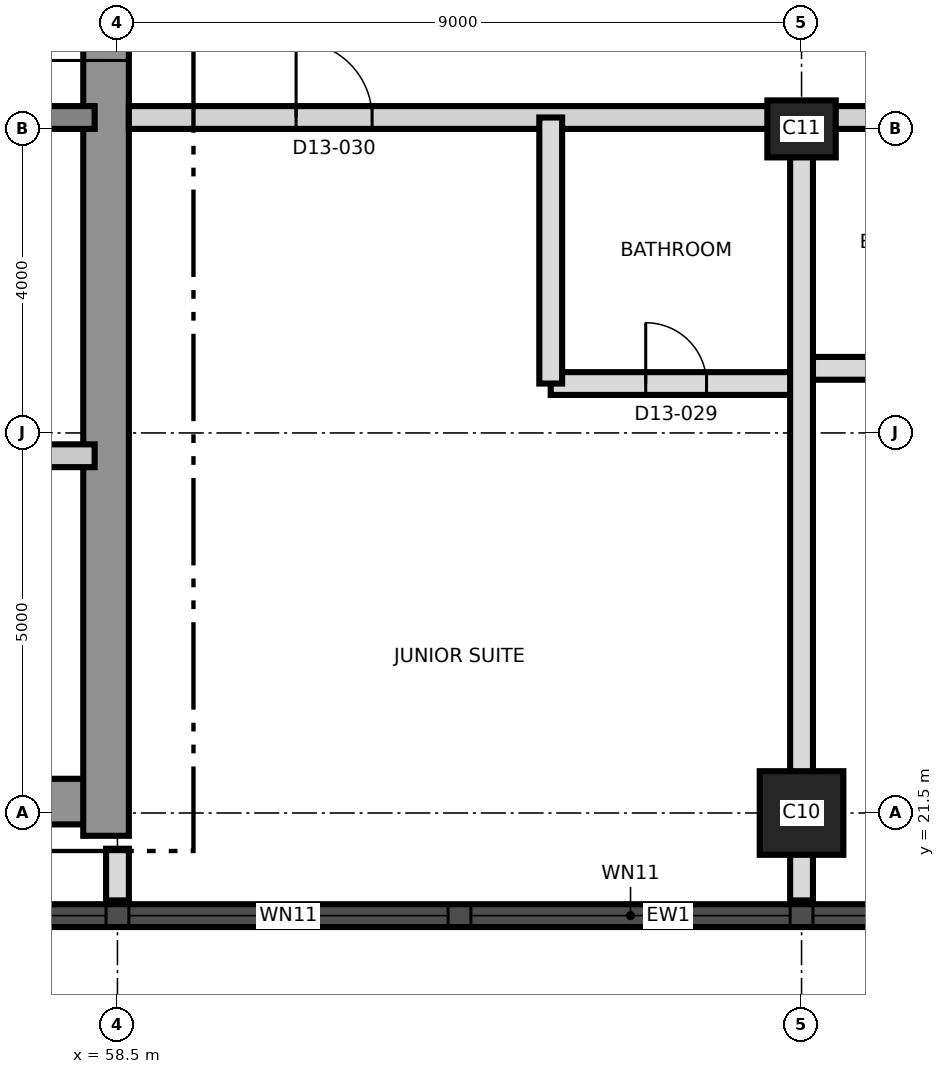
"""IFC4 building model, lengths in metres.
Left out: names, types, materials, properties, quantities, classifications, styles, units other than length and angle.
Written with IfcOpenShell. Run it as: python <this file> out.ifc"""

import sys

from ifc_helpers import new_model, si_unit, direction, frame, frame_2d, origin, origin_2d, place, context, subcontext, project, spatial, rectangle, extrude, element, fill, save


model = new_model("IFC4")
c1 = context("Model", 3, precision=1e-05, world=origin(), true_north=direction((0.0, 1.0)))
c2 = subcontext(c1, "Body", "Model", "MODEL_VIEW")
j1 = project(units=[si_unit("LENGTHUNIT", "METRE"), si_unit("PLANEANGLEUNIT", "RADIAN")], contexts=[c1])
p1 = place(None, origin())
s1 = spatial("IfcSite", under=j1, at=p1, CompositionType="ELEMENT")
p2 = place(p1, origin())
s2 = spatial("IfcBuilding", under=s1, at=p2, CompositionType="ELEMENT")
p3 = place(p2, frame((0.0, 0.0, 142.2)))
s3 = spatial("IfcBuildingStorey", under=s2, at=p3, CompositionType="ELEMENT", Elevation=142.2)
p4 = place(p3, frame((31.2, 21.65, 0.0), z_axis=(0.0, 0.0, 1.0), x_axis=(1.0, 0.0, 0.0)))
e1 = element("IfcWall", 1, at=p4, inside=s3, PredefinedType="SHEAR", context=c2, shape_type="SweptSolid", body=[
    extrude(rectangle(XDim=27.0, YDim=0.6, at=frame_2d((13.5, 0.0))), origin(), (0.0, 0.0, 1.0), 3.7),
])
p5 = place(p3, frame((58.35, 21.2, 0.0), z_axis=(0.0, 0.0, 1.0), x_axis=(0.0, 1.0, 0.0)))
e2 = element("IfcWall", 2, at=p5, inside=s3, PredefinedType="SHEAR", context=c2, shape_type="SweptSolid", body=[
    extrude(rectangle(XDim=18.6, YDim=0.6, at=frame_2d((9.3, 0.0))), origin(), (0.0, 0.0, 1.0), 3.7),
])
p6 = place(p5, frame((10.2, 0.0, 0.0)))
e3 = element("IfcOpeningElement", 3, at=p6, cuts=e2, PredefinedType="OPENING", context=c2, shape_type="SweptSolid", body=[
    extrude(rectangle(XDim=1.2, YDim=2.1, at=frame_2d((0.6, 1.05))), frame((0.0, 0.31, 0.0), z_axis=(0.0, -1.0, 0.0), x_axis=(1.0, 0.0, 0.0)), (0.0, 0.0, 1.0), 0.62),
])
p7 = place(p3, frame((31.8, 30.65, 0.0), z_axis=(0.0, 0.0, 1.0), x_axis=(1.0, 0.0, 0.0)))
e4 = element("IfcWall", 4, at=p7, inside=s3, PredefinedType="SHEAR", context=c2, shape_type="SweptSolid", body=[
    extrude(rectangle(XDim=26.4, YDim=0.3, at=frame_2d((13.2, 0.0))), origin(), (0.0, 0.0, 1.0), 3.7),
])
p8 = place(p7, frame((24.7, 0.0, 0.0)))
e5 = element("IfcOpeningElement", 5, at=p8, cuts=e4, PredefinedType="OPENING", context=c2, shape_type="SweptSolid", body=[
    extrude(rectangle(XDim=1.0, YDim=2.1, at=frame_2d((0.5, 1.05))), frame((0.0, 0.16, 0.0), z_axis=(0.0, -1.0, 0.0), x_axis=(1.0, 0.0, 0.0)), (0.0, 0.0, 1.0), 0.32),
])
p9 = place(p7, frame((4.0, 0.0, 0.0)))
e6 = element("IfcOpeningElement", 6, at=p9, cuts=e4, PredefinedType="OPENING", context=c2, shape_type="SweptSolid", body=[
    extrude(rectangle(XDim=1.0, YDim=2.1, at=frame_2d((0.5, 1.05))), frame((0.0, 0.16, 0.0), z_axis=(0.0, -1.0, 0.0), x_axis=(1.0, 0.0, 0.0)), (0.0, 0.0, 1.0), 0.32),
])
p10 = place(p3, frame((67.5, 21.5, 0.0), z_axis=(0.0, 0.0, 1.0), x_axis=(1.0, 0.0, 0.0)))
e7 = element("IfcColumn", 7, at=p10, inside=s3, PredefinedType="COLUMN", context=c2, shape_type="SweptSolid", body=[
    extrude(rectangle(XDim=1.1, YDim=1.1, at=origin_2d()), origin(), (0.0, 0.0, 1.0), 3.7),
])
p11 = place(p3, frame((67.5, 30.5, 0.0), z_axis=(0.0, 0.0, 1.0), x_axis=(1.0, 0.0, 0.0)))
e8 = element("IfcColumn", 8, at=p11, inside=s3, PredefinedType="COLUMN", context=c2, shape_type="SweptSolid", body=[
    extrude(rectangle(XDim=0.9, YDim=0.75, at=origin_2d()), origin(), (0.0, 0.0, 1.0), 3.7),
])
p12 = place(p3, frame((44.011, 20.15, 0.0), z_axis=(0.0, 0.0, 1.0), x_axis=(1.0, 0.0, 0.0)))
e9 = element("IfcWall", 9, at=p12, inside=s3, PredefinedType="SOLIDWALL", context=c2, shape_type="SweptSolid", body=[
    extrude(rectangle(XDim=43.476, YDim=0.3, at=frame_2d((21.738, 0.0))), origin(), (0.0, 0.0, 1.0), 3.4),
])
p13 = place(p12, frame((1.845, 0.0, 0.3)))
e10 = element("IfcOpeningElement", 10, at=p13, cuts=e9, PredefinedType="OPENING", context=c2, shape_type="SweptSolid", body=[
    extrude(rectangle(XDim=1.8, YDim=2.4, at=frame_2d((0.9, 1.2))), frame((0.0, 0.16, 0.0), z_axis=(0.0, -1.0, 0.0), x_axis=(1.0, 0.0, 0.0)), (0.0, 0.0, 1.0), 0.32),
])
p14 = place(p12, frame((5.639, 0.0, 0.9)))
e11 = element("IfcOpeningElement", 11, at=p14, cuts=e9, PredefinedType="OPENING", context=c2, shape_type="SweptSolid", body=[
    extrude(rectangle(XDim=4.2, YDim=1.5, at=frame_2d((2.1, 0.75))), frame((0.0, 0.16, 0.0), z_axis=(0.0, -1.0, 0.0), x_axis=(1.0, 0.0, 0.0)), (0.0, 0.0, 1.0), 0.32),
])
p15 = place(p12, frame((10.139, 0.0, 0.9)))
e12 = element("IfcOpeningElement", 12, at=p15, cuts=e9, PredefinedType="OPENING", context=c2, shape_type="SweptSolid", body=[
    extrude(rectangle(XDim=4.2, YDim=1.5, at=frame_2d((2.1, 0.75))), frame((0.0, 0.16, 0.0), z_axis=(0.0, -1.0, 0.0), x_axis=(1.0, 0.0, 0.0)), (0.0, 0.0, 1.0), 0.32),
])
p16 = place(p12, frame((14.639, 0.0, 0.9)))
e13 = element("IfcOpeningElement", 13, at=p16, cuts=e9, PredefinedType="OPENING", context=c2, shape_type="SweptSolid", body=[
    extrude(rectangle(XDim=4.2, YDim=1.5, at=frame_2d((2.1, 0.75))), frame((0.0, 0.16, 0.0), z_axis=(0.0, -1.0, 0.0), x_axis=(1.0, 0.0, 0.0)), (0.0, 0.0, 1.0), 0.32),
])
p17 = place(p12, frame((19.139, 0.0, 0.9)))
e14 = element("IfcOpeningElement", 14, at=p17, cuts=e9, PredefinedType="OPENING", context=c2, shape_type="SweptSolid", body=[
    extrude(rectangle(XDim=4.2, YDim=1.5, at=frame_2d((2.1, 0.75))), frame((0.0, 0.16, 0.0), z_axis=(0.0, -1.0, 0.0), x_axis=(1.0, 0.0, 0.0)), (0.0, 0.0, 1.0), 0.32),
])
p18 = place(p12, frame((23.639, 0.0, 0.9)))
e15 = element("IfcOpeningElement", 15, at=p18, cuts=e9, PredefinedType="OPENING", context=c2, shape_type="SweptSolid", body=[
    extrude(rectangle(XDim=4.2, YDim=1.5, at=frame_2d((2.1, 0.75))), frame((0.0, 0.16, 0.0), z_axis=(0.0, -1.0, 0.0), x_axis=(1.0, 0.0, 0.0)), (0.0, 0.0, 1.0), 0.32),
])
p19 = place(p12, frame((28.139, 0.0, 0.9)))
e16 = element("IfcOpeningElement", 16, at=p19, cuts=e9, PredefinedType="OPENING", context=c2, shape_type="SweptSolid", body=[
    extrude(rectangle(XDim=4.2, YDim=1.5, at=frame_2d((2.1, 0.75))), frame((0.0, 0.16, 0.0), z_axis=(0.0, -1.0, 0.0), x_axis=(1.0, 0.0, 0.0)), (0.0, 0.0, 1.0), 0.32),
])
p20 = place(p12, frame((32.639, 0.0, 0.9)))
e17 = element("IfcOpeningElement", 17, at=p20, cuts=e9, PredefinedType="OPENING", context=c2, shape_type="SweptSolid", body=[
    extrude(rectangle(XDim=4.2, YDim=1.5, at=frame_2d((2.1, 0.75))), frame((0.0, 0.16, 0.0), z_axis=(0.0, -1.0, 0.0), x_axis=(1.0, 0.0, 0.0)), (0.0, 0.0, 1.0), 0.32),
])
p21 = place(p12, frame((37.139, 0.0, 0.9)))
e18 = element("IfcOpeningElement", 18, at=p21, cuts=e9, PredefinedType="OPENING", context=c2, shape_type="SweptSolid", body=[
    extrude(rectangle(XDim=4.2, YDim=1.5, at=frame_2d((2.1, 0.75))), frame((0.0, 0.16, 0.0), z_axis=(0.0, -1.0, 0.0), x_axis=(1.0, 0.0, 0.0)), (0.0, 0.0, 1.0), 0.32),
])
p22 = place(p3, frame((55.8, 26.2, 0.0), z_axis=(0.0, 0.0, 1.0), x_axis=(1.0, 0.0, 0.0)))
e19 = element("IfcWall", 19, at=p22, inside=s3, PredefinedType="PARTITIONING", context=c2, shape_type="SweptSolid", body=[
    extrude(rectangle(XDim=2.4, YDim=0.3, at=frame_2d((1.2, 0.0))), origin(), (0.0, 0.0, 1.0), 3.4),
])
p23 = place(p22, frame((0.75, 0.0, 0.0)))
e20 = element("IfcOpeningElement", 20, at=p23, cuts=e19, PredefinedType="OPENING", context=c2, shape_type="SweptSolid", body=[
    extrude(rectangle(XDim=0.9, YDim=2.1, at=frame_2d((0.45, 1.05))), frame((0.0, 0.16, 0.0), z_axis=(0.0, -1.0, 0.0), x_axis=(1.0, 0.0, 0.0)), (0.0, 0.0, 1.0), 0.32),
])
p24 = place(p3, frame((64.2, 27.15, 0.0), z_axis=(0.0, 0.0, 1.0), x_axis=(1.0, 0.0, 0.0)))
e21 = element("IfcWall", 21, at=p24, inside=s3, PredefinedType="PARTITIONING", context=c2, shape_type="SweptSolid", body=[
    extrude(rectangle(XDim=3.3, YDim=0.3, at=frame_2d((1.65, 0.0))), origin(), (0.0, 0.0, 1.0), 3.4),
])
p25 = place(p24, frame((1.25, 0.0, 0.0)))
e22 = element("IfcOpeningElement", 22, at=p25, cuts=e21, PredefinedType="OPENING", context=c2, shape_type="SweptSolid", body=[
    extrude(rectangle(XDim=0.8, YDim=2.1, at=frame_2d((0.4, 1.05))), frame((0.0, 0.16, 0.0), z_axis=(0.0, -1.0, 0.0), x_axis=(1.0, 0.0, 0.0)), (0.0, 0.0, 1.0), 0.32),
])
p26 = place(p3, frame((67.5, 27.35, 0.0), z_axis=(0.0, 0.0, 1.0), x_axis=(1.0, 0.0, 0.0)))
e23 = element("IfcWall", 23, at=p26, inside=s3, PredefinedType="PARTITIONING", context=c2, shape_type="SweptSolid", body=[
    extrude(rectangle(XDim=3.0, YDim=0.3, at=frame_2d((1.5, 0.0))), origin(), (0.0, 0.0, 1.0), 3.4),
])
p27 = place(p26, frame((1.1, 0.0, 0.0)))
e24 = element("IfcOpeningElement", 24, at=p27, cuts=e23, PredefinedType="OPENING", context=c2, shape_type="SweptSolid", body=[
    extrude(rectangle(XDim=0.8, YDim=2.1, at=frame_2d((0.4, 1.05))), frame((0.0, 0.16, 0.0), z_axis=(0.0, -1.0, 0.0), x_axis=(1.0, 0.0, 0.0)), (0.0, 0.0, 1.0), 0.32),
])
p28 = place(p3, frame((58.65, 30.65, 0.0), z_axis=(0.0, 0.0, 1.0), x_axis=(1.0, 0.0, 0.0)))
e25 = element("IfcWall", 25, at=p28, inside=s3, PredefinedType="PARTITIONING", context=c2, shape_type="SweptSolid", body=[
    extrude(rectangle(XDim=26.68, YDim=0.3, at=frame_2d((13.34, 0.0))), origin(), (0.0, 0.0, 1.0), 3.4),
])
p29 = place(p28, frame((2.2, 0.0, 0.0)))
e26 = element("IfcOpeningElement", 26, at=p29, cuts=e25, PredefinedType="OPENING", context=c2, shape_type="SweptSolid", body=[
    extrude(rectangle(XDim=1.0, YDim=2.4, at=frame_2d((0.5, 1.2))), frame((0.0, 0.16, 0.0), z_axis=(0.0, -1.0, 0.0), x_axis=(1.0, 0.0, 0.0)), (0.0, 0.0, 1.0), 0.32),
])
p30 = place(p28, frame((12.85, 0.0, 0.0)))
e27 = element("IfcOpeningElement", 27, at=p30, cuts=e25, PredefinedType="OPENING", context=c2, shape_type="SweptSolid", body=[
    extrude(rectangle(XDim=1.0, YDim=2.4, at=frame_2d((0.5, 1.2))), frame((0.0, 0.16, 0.0), z_axis=(0.0, -1.0, 0.0), x_axis=(1.0, 0.0, 0.0)), (0.0, 0.0, 1.0), 0.32),
])
p31 = place(p28, frame((20.77, 0.0, 0.0)))
e28 = element("IfcOpeningElement", 28, at=p31, cuts=e25, PredefinedType="OPENING", context=c2, shape_type="SweptSolid", body=[
    extrude(rectangle(XDim=1.0, YDim=2.1, at=frame_2d((0.5, 1.05))), frame((0.0, 0.16, 0.0), z_axis=(0.0, -1.0, 0.0), x_axis=(1.0, 0.0, 0.0)), (0.0, 0.0, 1.0), 0.32),
])
p32 = place(p28, frame((22.57, 0.0, 0.0)))
e29 = element("IfcOpeningElement", 29, at=p32, cuts=e25, PredefinedType="OPENING", context=c2, shape_type="SweptSolid", body=[
    extrude(rectangle(XDim=1.0, YDim=2.1, at=frame_2d((0.5, 1.05))), frame((0.0, 0.16, 0.0), z_axis=(0.0, -1.0, 0.0), x_axis=(1.0, 0.0, 0.0)), (0.0, 0.0, 1.0), 0.32),
])
p33 = place(p3, frame((58.5, 20.35, 0.0), z_axis=(0.0, 0.0, 1.0), x_axis=(0.0, 1.0, 0.0)))
e30 = element("IfcWall", 30, at=p33, inside=s3, PredefinedType="PARTITIONING", context=c2, shape_type="SweptSolid", body=[
    extrude(rectangle(XDim=0.68, YDim=0.3, at=frame_2d((0.34, 0.0))), origin(), (0.0, 0.0, 1.0), 3.4),
])
p34 = place(p3, frame((64.2, 27.15, 0.0), z_axis=(0.0, 0.0, 1.0), x_axis=(0.0, 1.0, 0.0)))
e31 = element("IfcWall", 31, at=p34, inside=s3, PredefinedType="PARTITIONING", context=c2, shape_type="SweptSolid", body=[
    extrude(rectangle(XDim=3.5, YDim=0.3, at=frame_2d((1.75, 0.0))), origin(), (0.0, 0.0, 1.0), 3.4),
])
p35 = place(p3, frame((67.5, 20.35, 0.0), z_axis=(0.0, 0.0, 1.0), x_axis=(0.0, 1.0, 0.0)))
e32 = element("IfcWall", 32, at=p35, inside=s3, PredefinedType="PARTITIONING", context=c2, shape_type="SweptSolid", body=[
    extrude(rectangle(XDim=10.3, YDim=0.3, at=frame_2d((5.15, 0.0))), origin(), (0.0, 0.0, 1.0), 3.4),
])
p36 = place(p15, origin())
e33 = element("IfcWindow", 33, at=p36, inside=s3, PartitioningType="SINGLE_PANEL", PredefinedType="WINDOW", context=c2, shape_type="SweptSolid", body=[
    extrude(rectangle(XDim=4.2, YDim=1.5, at=frame_2d((2.1, 0.75))), frame((0.0, 0.03, 0.0), z_axis=(0.0, -1.0, 0.0), x_axis=(1.0, 0.0, 0.0)), (0.0, 0.0, 1.0), 0.06),
])
fill(e12, e33)
p37 = place(p16, origin())
e34 = element("IfcWindow", 34, at=p37, inside=s3, PartitioningType="SINGLE_PANEL", PredefinedType="WINDOW", context=c2, shape_type="SweptSolid", body=[
    extrude(rectangle(XDim=4.2, YDim=1.5, at=frame_2d((2.1, 0.75))), frame((0.0, 0.03, 0.0), z_axis=(0.0, -1.0, 0.0), x_axis=(1.0, 0.0, 0.0)), (0.0, 0.0, 1.0), 0.06),
])
fill(e13, e34)
p38 = place(p17, origin())
e35 = element("IfcWindow", 35, at=p38, inside=s3, PartitioningType="SINGLE_PANEL", PredefinedType="WINDOW", context=c2, shape_type="SweptSolid", body=[
    extrude(rectangle(XDim=4.2, YDim=1.5, at=frame_2d((2.1, 0.75))), frame((0.0, 0.03, 0.0), z_axis=(0.0, -1.0, 0.0), x_axis=(1.0, 0.0, 0.0)), (0.0, 0.0, 1.0), 0.06),
])
fill(e14, e35)
p39 = place(p18, origin())
e36 = element("IfcWindow", 36, at=p39, inside=s3, PartitioningType="SINGLE_PANEL", PredefinedType="WINDOW", context=c2, shape_type="SweptSolid", body=[
    extrude(rectangle(XDim=4.2, YDim=1.5, at=frame_2d((2.1, 0.75))), frame((0.0, 0.03, 0.0), z_axis=(0.0, -1.0, 0.0), x_axis=(1.0, 0.0, 0.0)), (0.0, 0.0, 1.0), 0.06),
])
fill(e15, e36)
p40 = place(p6, origin())
e37 = element("IfcDoor", 37, at=p40, inside=s3, OperationType="SINGLE_SWING_LEFT", PredefinedType="DOOR", context=c2, shape_type="SweptSolid", body=[
    extrude(rectangle(XDim=1.2, YDim=2.1, at=frame_2d((0.6, 1.05))), frame((0.0, 0.025, 0.0), z_axis=(0.0, -1.0, 0.0), x_axis=(1.0, 0.0, 0.0)), (0.0, 0.0, 1.0), 0.05),
])
fill(e3, e37)
p41 = place(p25, origin())
e38 = element("IfcDoor", 38, at=p41, inside=s3, OperationType="SINGLE_SWING_LEFT", PredefinedType="DOOR", context=c2, shape_type="SweptSolid", body=[
    extrude(rectangle(XDim=0.8, YDim=2.1, at=frame_2d((0.4, 1.05))), frame((0.0, 0.025, 0.0), z_axis=(0.0, -1.0, 0.0), x_axis=(1.0, 0.0, 0.0)), (0.0, 0.0, 1.0), 0.05),
])
fill(e22, e38)
p42 = place(p29, origin())
e39 = element("IfcDoor", 39, at=p42, inside=s3, OperationType="SINGLE_SWING_LEFT", PredefinedType="DOOR", context=c2, shape_type="SweptSolid", body=[
    extrude(rectangle(XDim=1.0, YDim=2.4, at=frame_2d((0.5, 1.2))), frame((0.0, 0.025, 0.0), z_axis=(0.0, -1.0, 0.0), x_axis=(1.0, 0.0, 0.0)), (0.0, 0.0, 1.0), 0.05),
])
fill(e26, e39)
save(model, sys.argv[1])
